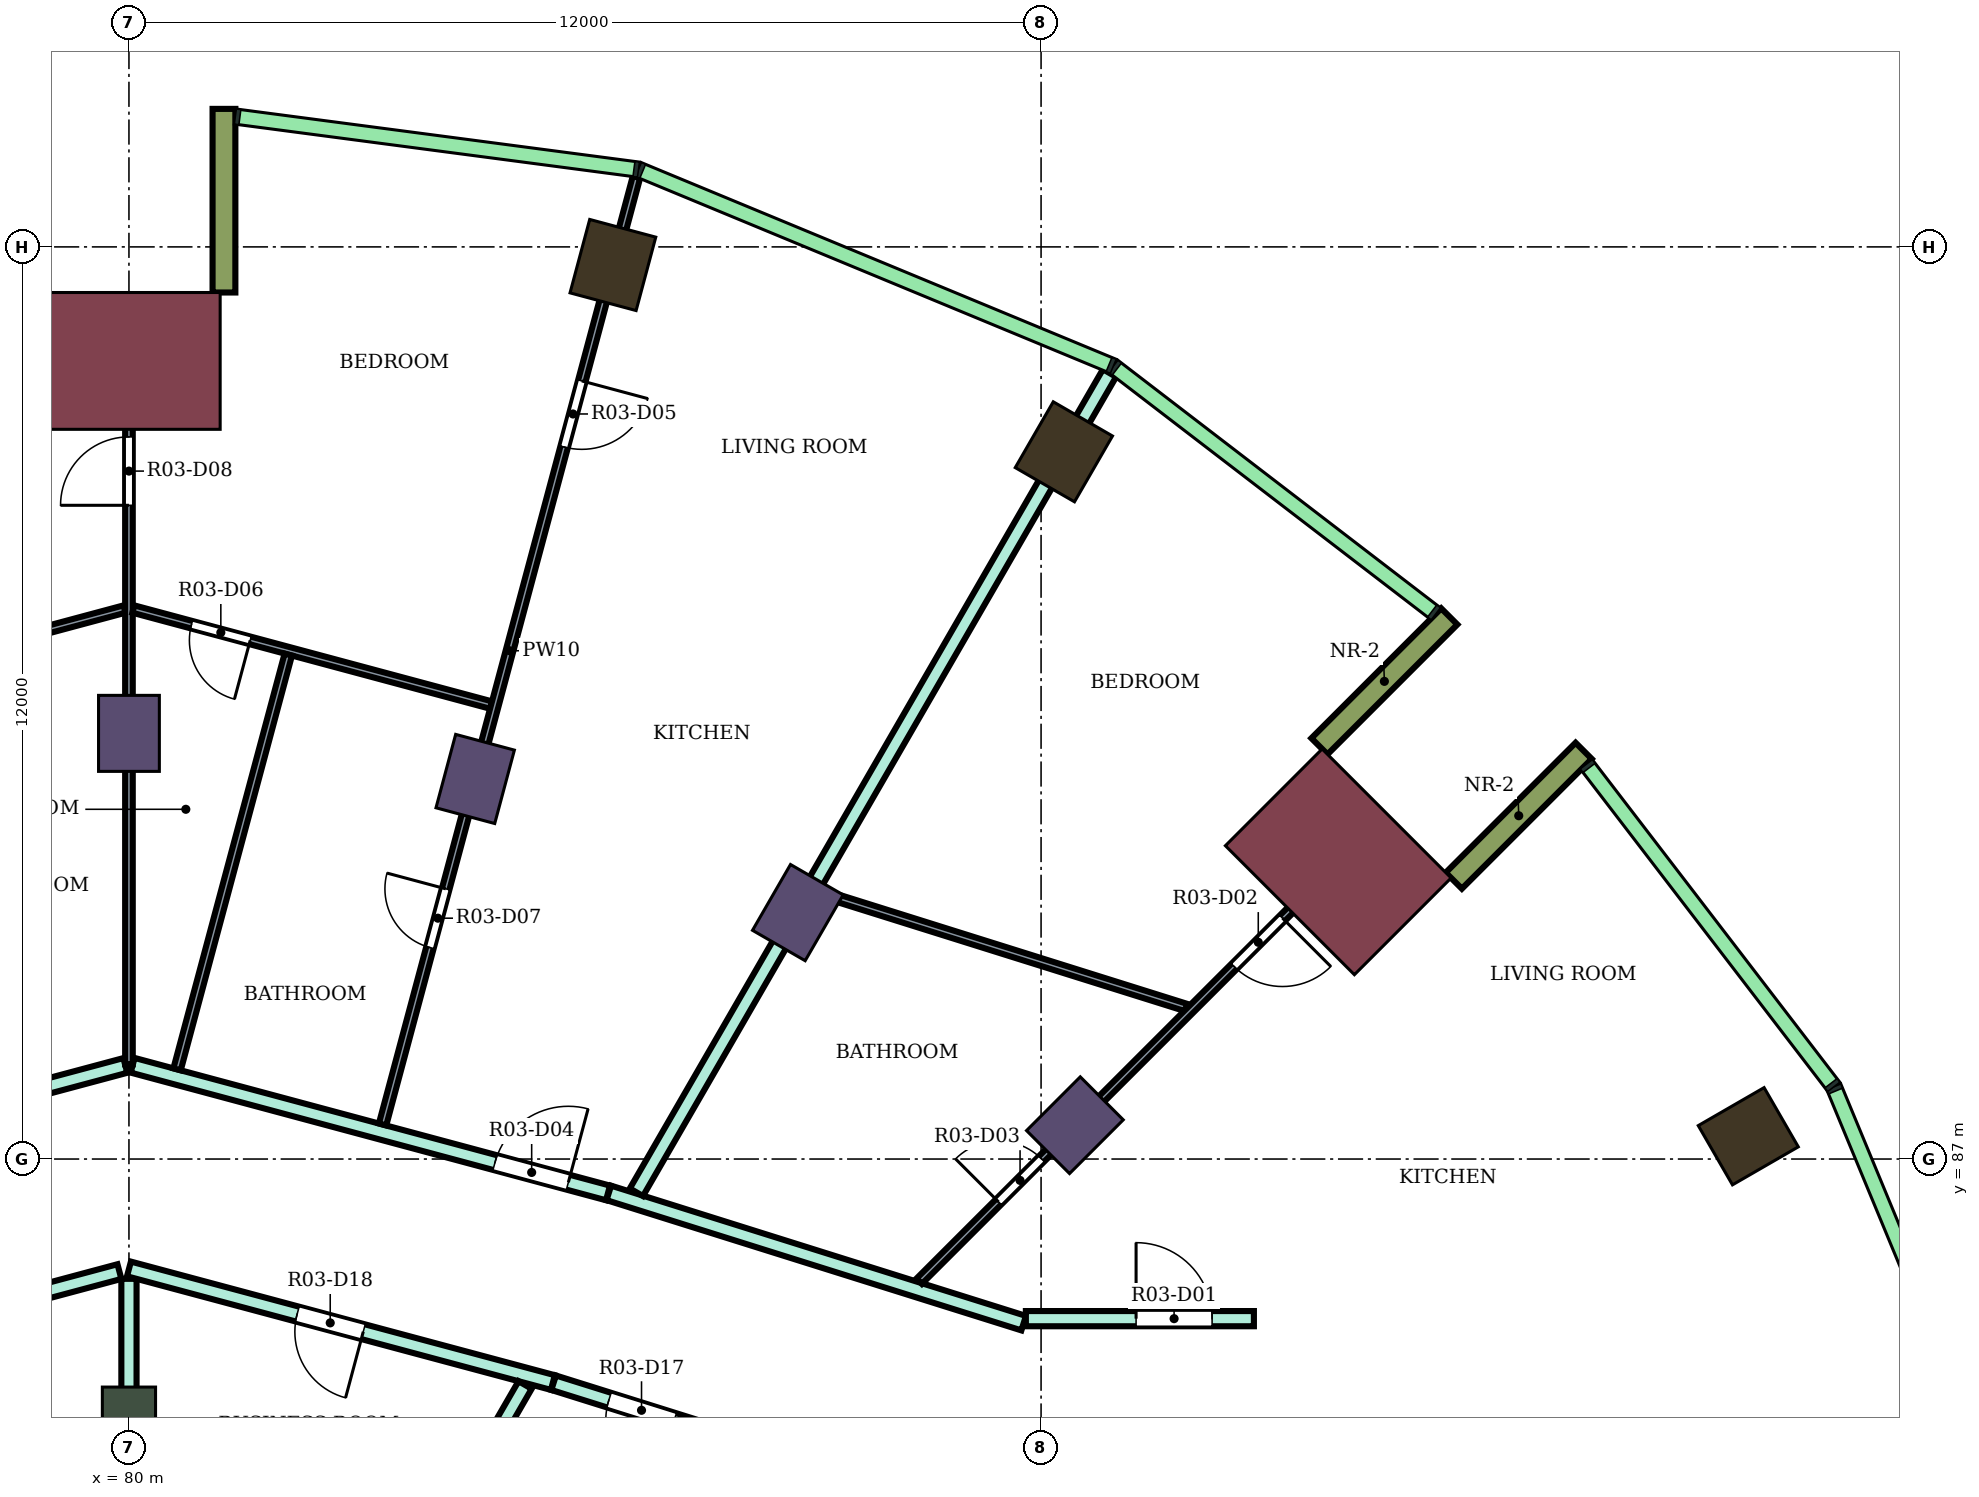
"""IFC4 building model, lengths in metres.
Left out: names, types, materials, properties, quantities, classifications, styles, units other than length and angle.
Written with IfcOpenShell. Run it as: python <this file> out.ifc"""

import sys

from ifc_helpers import new_model, si_unit, direction, frame, frame_2d, origin, origin_2d, place, context, subcontext, project, spatial, rectangle, extrude, element, fill, save


model = new_model("IFC4")
c1 = context("Model", 3, precision=1e-05, world=origin(), true_north=direction((0.0, 1.0)))
c2 = subcontext(c1, "Body", "Model", "MODEL_VIEW")
j1 = project(units=[si_unit("LENGTHUNIT", "METRE"), si_unit("PLANEANGLEUNIT", "RADIAN")], contexts=[c1])
p1 = place(None, origin())
s1 = spatial("IfcSite", under=j1, at=p1, CompositionType="ELEMENT")
p2 = place(p1, origin())
s2 = spatial("IfcBuilding", under=s1, at=p2, CompositionType="ELEMENT")
p3 = place(p2, frame((0.0, 0.0, 190.5)))
s3 = spatial("IfcBuildingStorey", under=s2, at=p3, CompositionType="ELEMENT", Elevation=190.5)
for number, where, z_axis, x_axis in (
    (1, (101.304, 87.3, 0.0), (0.0, 0.0, 1.0), (0.866, 0.5, 0.0)),
    (2, (92.3, 96.304, 0.0), (0.0, 0.0, 1.0), (0.5, 0.866, 0.0)),
    (3, (86.367, 98.762, 0.0), (0.0, 0.0, 1.0), (0.259, 0.966, 0.0)),
):
    element("IfcColumn", number, at=place(p3, frame(where, z_axis=z_axis, x_axis=x_axis)), inside=s3, PredefinedType="COLUMN", context=c2, shape_type="SweptSolid", body=[
        extrude(rectangle(XDim=1.0, YDim=0.9, at=origin_2d()), origin(), (0.0, 0.0, 1.0), 4.1),
    ])
for number, where, z_axis, x_axis in (
    (4, (92.445, 87.445, 0.0), (0.0, 0.0, 1.0), (0.707, 0.707, 0.0)),
    (5, (88.8, 90.242, 0.0), (0.0, 0.0, 1.0), (0.5, 0.866, 0.0)),
    (6, (84.555, 92.0, 0.0), (0.0, 0.0, 1.0), (0.259, 0.966, 0.0)),
    (7, (80.0, 92.6, 0.0), (0.0, 0.0, 1.0), (0.0, 1.0, 0.0)),
):
    element("IfcColumn", number, at=place(p3, frame(where, z_axis=z_axis, x_axis=x_axis)), inside=s3, PredefinedType="COLUMN", context=c2, shape_type="SweptSolid", body=[
        extrude(rectangle(XDim=1.0, YDim=0.8, at=origin_2d()), origin(), (0.0, 0.0, 1.0), 4.1),
    ])
p4 = place(p3, frame((80.0, 83.6, 0.0), z_axis=(0.0, 0.0, 1.0), x_axis=(0.0, 1.0, 0.0)))
e8 = element("IfcColumn", 8, at=p4, inside=s3, PredefinedType="COLUMN", context=c2, shape_type="SweptSolid", body=[
    extrude(rectangle(XDim=0.8, YDim=0.7, at=origin_2d()), origin(), (0.0, 0.0, 1.0), 4.1),
])
for number, where, z_axis, x_axis in (
    (9, (95.91, 90.91, 0.0), (0.0, 0.0, 1.0), (0.707, 0.707, 0.0)),
    (10, (80.0, 97.5, 0.0), (0.0, 0.0, 1.0), (0.0, 1.0, 0.0)),
):
    element("IfcColumn", number, at=place(p3, frame(where, z_axis=z_axis, x_axis=x_axis)), inside=s3, PredefinedType="COLUMN", context=c2, shape_type="SweptSolid", body=[
        extrude(rectangle(XDim=1.8, YDim=2.4, at=origin_2d()), origin(), (0.0, 0.0, 1.0), 4.1),
    ])
for number, where, z_axis, x_axis in (
    (11, (97.43, 90.662, 0.0), (0.0, 0.0, 1.0), (0.707, 0.707, 0.0)),
    (12, (95.662, 92.43, 0.0), (0.0, 0.0, 1.0), (0.707, 0.707, 0.0)),
    (13, (81.25, 98.4, 0.0), (0.0, 0.0, 1.0), (0.0, 1.0, 0.0)),
):
    element("IfcWall", number, at=place(p3, frame(where, z_axis=z_axis, x_axis=x_axis)), inside=s3, PredefinedType="NOTDEFINED", context=c2, shape_type="SweptSolid", body=[
        extrude(rectangle(XDim=2.416, YDim=0.3, at=frame_2d((1.208, 0.0))), origin(), (0.0, 0.0, 1.0), 4.1),
    ])
p5 = place(p3, frame((73.687, 86.554, 0.0), z_axis=(0.0, 0.0, 1.0), x_axis=(0.965992724769, 0.258569247387, 0.0)))
e14 = element("IfcWall", 14, at=p5, inside=s3, PredefinedType="PARTITIONING", context=c2, shape_type="SweptSolid", body=[
    extrude(rectangle(XDim=6.486, YDim=0.2, at=frame_2d((3.243, 0.0))), origin(), (0.0, 0.0, 1.0), 3.65),
])
p6 = place(p5, frame((0.214, 0.0, 0.0)))
e15 = element("IfcOpeningElement", 15, at=p6, cuts=e14, PredefinedType="OPENING", context=c2, shape_type="SweptSolid", body=[
    extrude(rectangle(XDim=1.0, YDim=2.1, at=frame_2d((0.5, 1.05))), frame((0.0, 0.11, 0.0), z_axis=(0.0, -1.0, 0.0), x_axis=(1.0, 0.0, 0.0)), (0.0, 0.0, 1.0), 0.22),
])
p7 = place(p3, frame((74.413, 84.057, 0.0), z_axis=(0.0, 0.0, 1.0), x_axis=(0.965972135939, 0.258646153246, 0.0)))
e16 = element("IfcWall", 16, at=p7, inside=s3, PredefinedType="PARTITIONING", context=c2, shape_type="SweptSolid", body=[
    extrude(rectangle(XDim=5.654, YDim=0.2, at=frame_2d((2.827, 0.0))), origin(), (0.0, 0.0, 1.0), 3.65),
])
p8 = place(p7, frame((2.593, 0.0, 0.0)))
e17 = element("IfcOpeningElement", 17, at=p8, cuts=e16, PredefinedType="OPENING", context=c2, shape_type="SweptSolid", body=[
    extrude(rectangle(XDim=0.9, YDim=2.1, at=frame_2d((0.45, 1.05))), frame((0.0, 0.11, 0.0), z_axis=(0.0, -1.0, 0.0), x_axis=(1.0, 0.0, 0.0)), (0.0, 0.0, 1.0), 0.22),
])
p9 = place(p3, frame((80.0, 82.699, 0.0), z_axis=(0.0, 0.0, 1.0), x_axis=(0.0, 1.0, 0.0)))
e18 = element("IfcWall", 18, at=p9, inside=s3, PredefinedType="PARTITIONING", context=c2, shape_type="SweptSolid", body=[
    extrude(rectangle(XDim=2.725, YDim=0.2, at=frame_2d((1.363, 0.0))), origin(), (0.0, 0.0, 1.0), 3.65),
])
p10 = place(p3, frame((80.0, 85.554, 0.0), z_axis=(0.0, 0.0, 1.0), x_axis=(0.965928989968, -0.258807237802, 0.0)))
e19 = element("IfcWall", 19, at=p10, inside=s3, PredefinedType="PARTITIONING", context=c2, shape_type="SweptSolid", body=[
    extrude(rectangle(XDim=5.774, YDim=0.2, at=frame_2d((2.887, 0.0))), origin(), (0.0, 0.0, 1.0), 3.65),
])
p11 = place(p10, frame((2.292, 0.0, 0.0)))
e20 = element("IfcOpeningElement", 20, at=p11, cuts=e19, PredefinedType="OPENING", context=c2, shape_type="SweptSolid", body=[
    extrude(rectangle(XDim=0.9, YDim=2.1, at=frame_2d((0.45, 1.05))), frame((0.0, 0.11, 0.0), z_axis=(0.0, -1.0, 0.0), x_axis=(1.0, 0.0, 0.0)), (0.0, 0.0, 1.0), 0.22),
])
p12 = place(p3, frame((80.048, 88.233, 0.0), z_axis=(0.0, 0.0, 1.0), x_axis=(0.965787353661, -0.259335280109, 0.0)))
e21 = element("IfcWall", 21, at=p12, inside=s3, PredefinedType="PARTITIONING", context=c2, shape_type="SweptSolid", body=[
    extrude(rectangle(XDim=6.476, YDim=0.2, at=frame_2d((3.238, 0.0))), origin(), (0.0, 0.0, 1.0), 3.65),
])
p13 = place(p12, frame((4.936, 0.0, 0.0)))
e22 = element("IfcOpeningElement", 22, at=p13, cuts=e21, PredefinedType="OPENING", context=c2, shape_type="SweptSolid", body=[
    extrude(rectangle(XDim=1.0, YDim=2.1, at=frame_2d((0.5, 1.05))), frame((0.0, 0.11, 0.0), z_axis=(0.0, -1.0, 0.0), x_axis=(1.0, 0.0, 0.0)), (0.0, 0.0, 1.0), 0.22),
])
p14 = place(p3, frame((83.849, 81.667, 0.0), z_axis=(0.0, 0.0, 1.0), x_axis=(0.500117899823, 0.865957323588, 0.0)))
e23 = element("IfcWall", 23, at=p14, inside=s3, PredefinedType="PARTITIONING", context=c2, shape_type="SweptSolid", body=[
    extrude(rectangle(XDim=2.725, YDim=0.2, at=frame_2d((1.363, 0.0))), origin(), (0.0, 0.0, 1.0), 3.65),
])
p15 = place(p3, frame((85.587, 84.057, 0.0), z_axis=(0.0, 0.0, 1.0), x_axis=(0.954239513179, -0.299043393987, 0.0)))
e24 = element("IfcWall", 24, at=p15, inside=s3, PredefinedType="PARTITIONING", context=c2, shape_type="SweptSolid", body=[
    extrude(rectangle(XDim=2.424, YDim=0.2, at=frame_2d((1.212, 0.0))), origin(), (0.0, 0.0, 1.0), 3.65),
])
p16 = place(p15, frame((0.762, 0.0, 0.0)))
e25 = element("IfcOpeningElement", 25, at=p16, cuts=e24, PredefinedType="OPENING", context=c2, shape_type="SweptSolid", body=[
    extrude(rectangle(XDim=0.9, YDim=2.1, at=frame_2d((0.45, 1.05))), frame((0.0, 0.11, 0.0), z_axis=(0.0, -1.0, 0.0), x_axis=(1.0, 0.0, 0.0)), (0.0, 0.0, 1.0), 0.22),
])
p17 = place(p3, frame((86.313, 86.554, 0.0), z_axis=(0.0, 0.0, 1.0), x_axis=(0.954081217458, -0.299548043717, 0.0)))
e26 = element("IfcWall", 26, at=p17, inside=s3, PredefinedType="PARTITIONING", context=c2, shape_type="SweptSolid", body=[
    extrude(rectangle(XDim=5.721, YDim=0.2, at=frame_2d((2.86, 0.0))), origin(), (0.0, 0.0, 1.0), 3.65),
])
p18 = place(p3, frame((86.676, 86.563, 0.0), z_axis=(0.0, 0.0, 1.0), x_axis=(0.500130524836, 0.865950032119, 0.0)))
e27 = element("IfcWall", 27, at=p18, inside=s3, PredefinedType="PARTITIONING", context=c2, shape_type="SweptSolid", body=[
    extrude(rectangle(XDim=12.446, YDim=0.2, at=frame_2d((6.223, 0.0))), origin(), (0.0, 0.0, 1.0), 3.65),
])
p19 = place(p3, frame((91.8, 84.9, 0.0), z_axis=(0.0, 0.0, 1.0), x_axis=(1.0, 0.0, 0.0)))
e28 = element("IfcWall", 28, at=p19, inside=s3, PredefinedType="PARTITIONING", context=c2, shape_type="SweptSolid", body=[
    extrude(rectangle(XDim=3.0, YDim=0.2, at=frame_2d((1.5, 0.0))), origin(), (0.0, 0.0, 1.0), 3.65),
])
p20 = place(p19, frame((1.45, 0.0, 0.0)))
e29 = element("IfcOpeningElement", 29, at=p20, cuts=e28, PredefinedType="OPENING", context=c2, shape_type="SweptSolid", body=[
    extrude(rectangle(XDim=1.0, YDim=2.1, at=frame_2d((0.5, 1.05))), frame((0.0, 0.11, 0.0), z_axis=(0.0, -1.0, 0.0), x_axis=(1.0, 0.0, 0.0)), (0.0, 0.0, 1.0), 0.22),
])
p21 = place(p3, frame((75.295, 92.989, 0.0), z_axis=(0.0, 0.0, 1.0), x_axis=(0.965829517501, 0.259178207271, 0.0)))
e30 = element("IfcWall", 30, at=p21, inside=s3, PredefinedType="PARTITIONING", context=c2, shape_type="SweptSolid", body=[
    extrude(rectangle(XDim=4.812, YDim=0.1, at=frame_2d((2.406, 0.0))), origin(), (0.0, 0.0, 1.0), 3.65),
])
p22 = place(p21, frame((1.981, 0.0, 0.0)))
e31 = element("IfcOpeningElement", 31, at=p22, cuts=e30, PredefinedType="OPENING", context=c2, shape_type="SweptSolid", body=[
    extrude(rectangle(XDim=0.8, YDim=2.1, at=frame_2d((0.4, 1.05))), frame((0.0, 0.06, 0.0), z_axis=(0.0, -1.0, 0.0), x_axis=(1.0, 0.0, 0.0)), (0.0, 0.0, 1.0), 0.12),
])
p23 = place(p3, frame((80.0, 88.246, 0.0), z_axis=(0.0, 0.0, 1.0), x_axis=(0.0, 1.0, 0.0)))
e32 = element("IfcWall", 32, at=p23, inside=s3, PredefinedType="PARTITIONING", context=c2, shape_type="SweptSolid", body=[
    extrude(rectangle(XDim=9.954, YDim=0.1, at=frame_2d((4.977, 0.0))), origin(), (0.0, 0.0, 1.0), 3.65),
])
p24 = place(p23, frame((7.354, 0.0, 0.0)))
e33 = element("IfcOpeningElement", 33, at=p24, cuts=e32, PredefinedType="OPENING", context=c2, shape_type="SweptSolid", body=[
    extrude(rectangle(XDim=0.9, YDim=2.1, at=frame_2d((0.45, 1.05))), frame((0.0, 0.06, 0.0), z_axis=(0.0, -1.0, 0.0), x_axis=(1.0, 0.0, 0.0)), (0.0, 0.0, 1.0), 0.12),
])
p25 = place(p3, frame((80.058, 94.235, 0.0), z_axis=(0.0, 0.0, 1.0), x_axis=(0.965831212389, -0.259171891173, 0.0)))
e34 = element("IfcWall", 34, at=p25, inside=s3, PredefinedType="PARTITIONING", context=c2, shape_type="SweptSolid", body=[
    extrude(rectangle(XDim=4.872, YDim=0.1, at=frame_2d((2.436, 0.0))), origin(), (0.0, 0.0, 1.0), 3.65),
])
p26 = place(p25, frame((0.792, 0.0, 0.0)))
e35 = element("IfcOpeningElement", 35, at=p26, cuts=e34, PredefinedType="OPENING", context=c2, shape_type="SweptSolid", body=[
    extrude(rectangle(XDim=0.8, YDim=2.1, at=frame_2d((0.4, 1.05))), frame((0.0, 0.06, 0.0), z_axis=(0.0, -1.0, 0.0), x_axis=(1.0, 0.0, 0.0)), (0.0, 0.0, 1.0), 0.12),
])
p27 = place(p3, frame((80.633, 88.18, 0.0), z_axis=(0.0, 0.0, 1.0), x_axis=(0.25898304477, 0.965881867788, 0.0)))
e36 = element("IfcWall", 36, at=p27, inside=s3, PredefinedType="PARTITIONING", context=c2, shape_type="SweptSolid", body=[
    extrude(rectangle(XDim=5.65, YDim=0.1, at=frame_2d((2.825, 0.0))), origin(), (0.0, 0.0, 1.0), 3.65),
])
p28 = place(p3, frame((83.337, 87.455, 0.0), z_axis=(0.0, 0.0, 1.0), x_axis=(0.258861232071, 0.965914521337, 0.0)))
e37 = element("IfcWall", 37, at=p28, inside=s3, PredefinedType="PARTITIONING", context=c2, shape_type="SweptSolid", body=[
    extrude(rectangle(XDim=12.904, YDim=0.1, at=frame_2d((6.452, 0.0))), origin(), (0.0, 0.0, 1.0), 3.65),
])
p29 = place(p28, frame((9.227, 0.0, 0.0)))
e38 = element("IfcOpeningElement", 38, at=p29, cuts=e37, PredefinedType="OPENING", context=c2, shape_type="SweptSolid", body=[
    extrude(rectangle(XDim=0.9, YDim=2.1, at=frame_2d((0.45, 1.05))), frame((0.0, 0.06, 0.0), z_axis=(0.0, -1.0, 0.0), x_axis=(1.0, 0.0, 0.0)), (0.0, 0.0, 1.0), 0.12),
])
p30 = place(p28, frame((2.409, 0.0, 0.0)))
e39 = element("IfcOpeningElement", 39, at=p30, cuts=e37, PredefinedType="OPENING", context=c2, shape_type="SweptSolid", body=[
    extrude(rectangle(XDim=0.8, YDim=2.1, at=frame_2d((0.4, 1.05))), frame((0.0, 0.06, 0.0), z_axis=(0.0, -1.0, 0.0), x_axis=(1.0, 0.0, 0.0)), (0.0, 0.0, 1.0), 0.12),
])
p31 = place(p3, frame((89.078, 90.508, 0.0), z_axis=(0.0, 0.0, 1.0), x_axis=(0.954199699612, -0.299170408398, 0.0)))
e40 = element("IfcWall", 40, at=p31, inside=s3, PredefinedType="PARTITIONING", context=c2, shape_type="SweptSolid", body=[
    extrude(rectangle(XDim=5.06, YDim=0.1, at=frame_2d((2.53, 0.0))), origin(), (0.0, 0.0, 1.0), 3.65),
])
p32 = place(p3, frame((90.397, 85.393, 0.0), z_axis=(0.0, 0.0, 1.0), x_axis=(0.707264750546, 0.706948776529, 0.0)))
e41 = element("IfcWall", 41, at=p32, inside=s3, PredefinedType="PARTITIONING", context=c2, shape_type="SweptSolid", body=[
    extrude(rectangle(XDim=8.499, YDim=0.1, at=frame_2d((4.25, 0.0))), origin(), (0.0, 0.0, 1.0), 3.65),
])
p33 = place(p32, frame((5.857, 0.0, 0.0)))
e42 = element("IfcOpeningElement", 42, at=p33, cuts=e41, PredefinedType="OPENING", context=c2, shape_type="SweptSolid", body=[
    extrude(rectangle(XDim=0.9, YDim=2.1, at=frame_2d((0.45, 1.05))), frame((0.0, 0.06, 0.0), z_axis=(0.0, -1.0, 0.0), x_axis=(1.0, 0.0, 0.0)), (0.0, 0.0, 1.0), 0.12),
])
p34 = place(p32, frame((1.476, 0.0, 0.0)))
e43 = element("IfcOpeningElement", 43, at=p34, cuts=e41, PredefinedType="OPENING", context=c2, shape_type="SweptSolid", body=[
    extrude(rectangle(XDim=0.8, YDim=2.1, at=frame_2d((0.4, 1.05))), frame((0.0, 0.06, 0.0), z_axis=(0.0, -1.0, 0.0), x_axis=(1.0, 0.0, 0.0)), (0.0, 0.0, 1.0), 0.12),
])
p35 = place(p20, origin())
e44 = element("IfcDoor", 44, at=p35, inside=s3, OperationType="SINGLE_SWING_LEFT", PredefinedType="DOOR", context=c2, shape_type="SweptSolid", body=[
    extrude(rectangle(XDim=1.0, YDim=2.1, at=frame_2d((0.5, 1.05))), frame((0.0, 0.025, 0.0), z_axis=(0.0, -1.0, 0.0), x_axis=(1.0, 0.0, 0.0)), (0.0, 0.0, 1.0), 0.05),
])
fill(e29, e44)
p36 = place(p33, frame((0.9, 0.0, 0.0), z_axis=(0.0, 0.0, 1.0), x_axis=(-1.0, 0.0, 0.0)))
e45 = element("IfcDoor", 45, at=p36, inside=s3, OperationType="SINGLE_SWING_LEFT", PredefinedType="DOOR", context=c2, shape_type="SweptSolid", body=[
    extrude(rectangle(XDim=0.9, YDim=2.1, at=frame_2d((0.45, 1.05))), frame((0.0, 0.025, 0.0), z_axis=(0.0, -1.0, 0.0), x_axis=(1.0, 0.0, 0.0)), (0.0, 0.0, 1.0), 0.05),
])
fill(e42, e45)
p37 = place(p34, origin())
e46 = element("IfcDoor", 46, at=p37, inside=s3, OperationType="SINGLE_SWING_LEFT", PredefinedType="DOOR", context=c2, shape_type="SweptSolid", body=[
    extrude(rectangle(XDim=0.8, YDim=2.1, at=frame_2d((0.4, 1.05))), frame((0.0, 0.025, 0.0), z_axis=(0.0, -1.0, 0.0), x_axis=(1.0, 0.0, 0.0)), (0.0, 0.0, 1.0), 0.05),
])
fill(e43, e46)
p38 = place(p13, origin())
e47 = element("IfcDoor", 47, at=p38, inside=s3, OperationType="SINGLE_SWING_RIGHT", PredefinedType="DOOR", context=c2, shape_type="SweptSolid", body=[
    extrude(rectangle(XDim=1.0, YDim=2.1, at=frame_2d((0.5, 1.05))), frame((0.0, 0.025, 0.0), z_axis=(0.0, -1.0, 0.0), x_axis=(1.0, 0.0, 0.0)), (0.0, 0.0, 1.0), 0.05),
])
fill(e22, e47)
p39 = place(p29, frame((0.9, 0.0, 0.0), z_axis=(0.0, 0.0, 1.0), x_axis=(-1.0, 0.0, 0.0)))
e48 = element("IfcDoor", 48, at=p39, inside=s3, OperationType="SINGLE_SWING_LEFT", PredefinedType="DOOR", context=c2, shape_type="SweptSolid", body=[
    extrude(rectangle(XDim=0.9, YDim=2.1, at=frame_2d((0.45, 1.05))), frame((0.0, 0.025, 0.0), z_axis=(0.0, -1.0, 0.0), x_axis=(1.0, 0.0, 0.0)), (0.0, 0.0, 1.0), 0.05),
])
fill(e38, e48)
p40 = place(p26, frame((0.8, 0.0, 0.0), z_axis=(0.0, 0.0, 1.0), x_axis=(-1.0, 0.0, 0.0)))
e49 = element("IfcDoor", 49, at=p40, inside=s3, OperationType="SINGLE_SWING_LEFT", PredefinedType="DOOR", context=c2, shape_type="SweptSolid", body=[
    extrude(rectangle(XDim=0.8, YDim=2.1, at=frame_2d((0.4, 1.05))), frame((0.0, 0.025, 0.0), z_axis=(0.0, -1.0, 0.0), x_axis=(1.0, 0.0, 0.0)), (0.0, 0.0, 1.0), 0.05),
])
fill(e35, e49)
p41 = place(p30, origin())
e50 = element("IfcDoor", 50, at=p41, inside=s3, OperationType="SINGLE_SWING_RIGHT", PredefinedType="DOOR", context=c2, shape_type="SweptSolid", body=[
    extrude(rectangle(XDim=0.8, YDim=2.1, at=frame_2d((0.4, 1.05))), frame((0.0, 0.025, 0.0), z_axis=(0.0, -1.0, 0.0), x_axis=(1.0, 0.0, 0.0)), (0.0, 0.0, 1.0), 0.05),
])
fill(e39, e50)
p42 = place(p24, origin())
e51 = element("IfcDoor", 51, at=p42, inside=s3, OperationType="SINGLE_SWING_LEFT", PredefinedType="DOOR", context=c2, shape_type="SweptSolid", body=[
    extrude(rectangle(XDim=0.9, YDim=2.1, at=frame_2d((0.45, 1.05))), frame((0.0, 0.025, 0.0), z_axis=(0.0, -1.0, 0.0), x_axis=(1.0, 0.0, 0.0)), (0.0, 0.0, 1.0), 0.05),
])
fill(e33, e51)
p43 = place(p16, frame((0.9, 0.0, 0.0), z_axis=(0.0, 0.0, 1.0), x_axis=(-1.0, 0.0, 0.0)))
e52 = element("IfcDoor", 52, at=p43, inside=s3, OperationType="SINGLE_SWING_LEFT", PredefinedType="DOOR", context=c2, shape_type="SweptSolid", body=[
    extrude(rectangle(XDim=0.9, YDim=2.1, at=frame_2d((0.45, 1.05))), frame((0.0, 0.025, 0.0), z_axis=(0.0, -1.0, 0.0), x_axis=(1.0, 0.0, 0.0)), (0.0, 0.0, 1.0), 0.05),
])
fill(e25, e52)
p44 = place(p11, frame((0.9, 0.0, 0.0), z_axis=(0.0, 0.0, 1.0), x_axis=(-1.0, 0.0, 0.0)))
e53 = element("IfcDoor", 53, at=p44, inside=s3, OperationType="SINGLE_SWING_LEFT", PredefinedType="DOOR", context=c2, shape_type="SweptSolid", body=[
    extrude(rectangle(XDim=0.9, YDim=2.1, at=frame_2d((0.45, 1.05))), frame((0.0, 0.025, 0.0), z_axis=(0.0, -1.0, 0.0), x_axis=(1.0, 0.0, 0.0)), (0.0, 0.0, 1.0), 0.05),
])
fill(e20, e53)
save(model, sys.argv[1])
